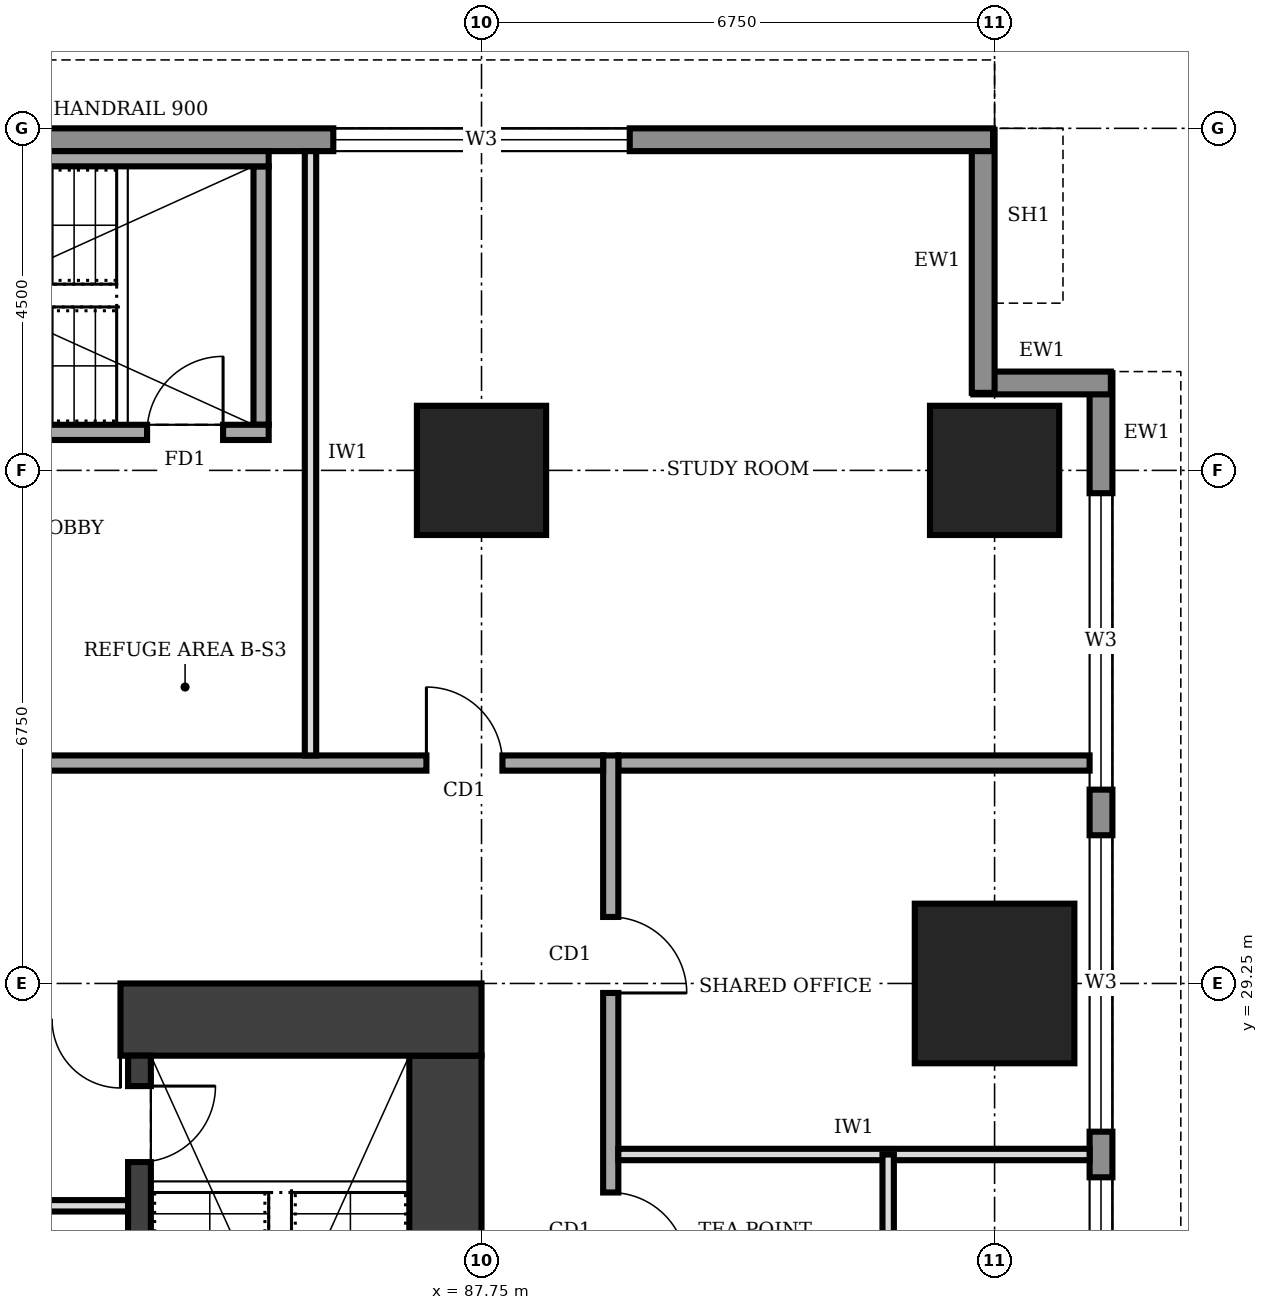
"""IFC4 building model, lengths in metres.
Left out: names, types, materials, properties, quantities, classifications, styles, units other than length and angle.
Written with IfcOpenShell. Run it as: python <this file> out.ifc"""

import sys

from ifc_helpers import new_model, si_unit, direction, frame, frame_2d, origin, origin_2d, place, context, subcontext, project, spatial, rectangle, extrude, element, fill, save


model = new_model("IFC4")
c1 = context("Model", 3, precision=1e-05, world=origin(), true_north=direction((0.0, 1.0)))
c2 = subcontext(c1, "Body", "Model", "MODEL_VIEW")
j1 = project(units=[si_unit("LENGTHUNIT", "METRE"), si_unit("PLANEANGLEUNIT", "RADIAN")], contexts=[c1])
p1 = place(None, origin())
s1 = spatial("IfcSite", under=j1, at=p1, CompositionType="ELEMENT")
p2 = place(p1, origin())
s2 = spatial("IfcBuilding", under=s1, at=p2, CompositionType="ELEMENT")
p3 = place(p2, frame((0.0, 0.0, 101.0)))
s3 = spatial("IfcBuildingStorey", under=s2, at=p3, CompositionType="ELEMENT", Elevation=101.0)
p4 = place(p3, frame((87.275, 12.2, 0.0), z_axis=(0.0, 0.0, 1.0), x_axis=(0.0, 1.0, 0.0)))
e1 = element("IfcWall", 1, at=p4, inside=s3, PredefinedType="SHEAR", context=c2, shape_type="SweptSolid", body=[
    extrude(rectangle(XDim=16.1, YDim=0.95, at=frame_2d((8.05, 0.0))), origin(), (0.0, 0.0, 1.0), 4.0),
])
p5 = place(p3, frame((87.75, 28.775, 0.0), z_axis=(0.0, 0.0, 1.0), x_axis=(-1.0, 0.0, 0.0)))
e2 = element("IfcWall", 2, at=p5, inside=s3, PredefinedType="SHEAR", context=c2, shape_type="SweptSolid", body=[
    extrude(rectangle(XDim=13.5, YDim=0.95, at=frame_2d((6.75, 0.0))), origin(), (0.0, 0.0, 1.0), 4.0),
])
p6 = place(p5, frame((4.75, 0.0, 0.0)))
e3 = element("IfcOpeningElement", 3, at=p6, cuts=e2, PredefinedType="OPENING", context=c2, shape_type="SweptSolid", body=[
    extrude(rectangle(XDim=1.8, YDim=2.1, at=frame_2d((0.9, 1.05))), frame((0.0, 0.485, 0.0), z_axis=(0.0, -1.0, 0.0), x_axis=(1.0, 0.0, 0.0)), (0.0, 0.0, 1.0), 0.97),
])
p7 = place(p3, frame((83.25, 12.2, 0.0), z_axis=(0.0, 0.0, 1.0), x_axis=(0.0, 1.0, 0.0)))
e4 = element("IfcWall", 4, at=p7, inside=s3, PredefinedType="SHEAR", context=c2, shape_type="SweptSolid", body=[
    extrude(rectangle(XDim=16.1, YDim=0.3, at=frame_2d((8.05, 0.0))), origin(), (0.0, 0.0, 1.0), 4.0),
])
p8 = place(p7, frame((14.7, 0.0, 0.0)))
e5 = element("IfcOpeningElement", 5, at=p8, cuts=e4, PredefinedType="OPENING", context=c2, shape_type="SweptSolid", body=[
    extrude(rectangle(XDim=1.0, YDim=2.1, at=frame_2d((0.5, 1.05))), frame((0.0, 0.16, 0.0), z_axis=(0.0, -1.0, 0.0), x_axis=(1.0, 0.0, 0.0)), (0.0, 0.0, 1.0), 0.32),
])
p9 = place(p7, frame((0.4, 0.0, 0.0)))
e6 = element("IfcOpeningElement", 6, at=p9, cuts=e4, PredefinedType="OPENING", context=c2, shape_type="SweptSolid", body=[
    extrude(rectangle(XDim=1.1, YDim=2.1, at=frame_2d((0.55, 1.05))), frame((0.0, 0.16, 0.0), z_axis=(0.0, -1.0, 0.0), x_axis=(1.0, 0.0, 0.0)), (0.0, 0.0, 1.0), 0.32),
])
p10 = place(p7, frame((6.0, 0.0, 0.0)))
e7 = element("IfcOpeningElement", 7, at=p10, cuts=e4, PredefinedType="OPENING", context=c2, shape_type="SweptSolid", body=[
    extrude(rectangle(XDim=1.1, YDim=2.1, at=frame_2d((0.55, 1.05))), frame((0.0, 0.16, 0.0), z_axis=(0.0, -1.0, 0.0), x_axis=(1.0, 0.0, 0.0)), (0.0, 0.0, 1.0), 0.32),
])
p11 = place(p3, frame((94.5, 29.25, 0.0), z_axis=(0.0, 0.0, 1.0), x_axis=(1.0, 0.0, 0.0)))
e8 = element("IfcColumn", 8, at=p11, inside=s3, PredefinedType="COLUMN", context=c2, shape_type="SweptSolid", body=[
    extrude(rectangle(XDim=2.1, YDim=2.1, at=origin_2d()), origin(), (0.0, 0.0, 1.0), 4.0),
])
for number, where, z_axis, x_axis in (
    (9, (87.75, 36.0, 0.0), (0.0, 0.0, 1.0), (1.0, 0.0, 0.0)),
    (10, (94.5, 36.0, 0.0), (0.0, 0.0, 1.0), (1.0, 0.0, 0.0)),
):
    element("IfcColumn", number, at=place(p3, frame(where, z_axis=z_axis, x_axis=x_axis)), inside=s3, PredefinedType="COLUMN", context=c2, shape_type="SweptSolid", body=[
        extrude(rectangle(XDim=1.7, YDim=1.7, at=origin_2d()), origin(), (0.0, 0.0, 1.0), 4.0),
    ])
p12 = place(p3, frame((95.9, 3.32, 0.0), z_axis=(0.0, 0.0, 1.0), x_axis=(0.0, 1.0, 0.0)))
e11 = element("IfcWall", 11, at=p12, inside=s3, PredefinedType="STANDARD", context=c2, shape_type="SweptSolid", body=[
    extrude(rectangle(XDim=33.96, YDim=0.3, at=frame_2d((16.98, 0.0))), origin(), (0.0, 0.0, 1.0), 3.75),
])
p13 = place(p12, frame((1.48, 0.0, 0.95)))
e12 = element("IfcOpeningElement", 12, at=p13, cuts=e11, PredefinedType="OPENING", context=c2, shape_type="SweptSolid", body=[
    extrude(rectangle(XDim=3.9, YDim=1.8, at=frame_2d((1.95, 0.9))), frame((0.0, 0.16, 0.0), z_axis=(0.0, -1.0, 0.0), x_axis=(1.0, 0.0, 0.0)), (0.0, 0.0, 1.0), 0.32),
])
p14 = place(p12, frame((5.98, 0.0, 0.95)))
e13 = element("IfcOpeningElement", 13, at=p14, cuts=e11, PredefinedType="OPENING", context=c2, shape_type="SweptSolid", body=[
    extrude(rectangle(XDim=3.9, YDim=1.8, at=frame_2d((1.95, 0.9))), frame((0.0, 0.16, 0.0), z_axis=(0.0, -1.0, 0.0), x_axis=(1.0, 0.0, 0.0)), (0.0, 0.0, 1.0), 0.32),
])
p15 = place(p12, frame((10.48, 0.0, 0.95)))
e14 = element("IfcOpeningElement", 14, at=p15, cuts=e11, PredefinedType="OPENING", context=c2, shape_type="SweptSolid", body=[
    extrude(rectangle(XDim=3.9, YDim=1.8, at=frame_2d((1.95, 0.9))), frame((0.0, 0.16, 0.0), z_axis=(0.0, -1.0, 0.0), x_axis=(1.0, 0.0, 0.0)), (0.0, 0.0, 1.0), 0.32),
])
p16 = place(p12, frame((14.98, 0.0, 0.95)))
e15 = element("IfcOpeningElement", 15, at=p16, cuts=e11, PredefinedType="OPENING", context=c2, shape_type="SweptSolid", body=[
    extrude(rectangle(XDim=3.9, YDim=1.8, at=frame_2d((1.95, 0.9))), frame((0.0, 0.16, 0.0), z_axis=(0.0, -1.0, 0.0), x_axis=(1.0, 0.0, 0.0)), (0.0, 0.0, 1.0), 0.32),
])
p17 = place(p12, frame((19.48, 0.0, 0.95)))
e16 = element("IfcOpeningElement", 16, at=p17, cuts=e11, PredefinedType="OPENING", context=c2, shape_type="SweptSolid", body=[
    extrude(rectangle(XDim=3.9, YDim=1.8, at=frame_2d((1.95, 0.9))), frame((0.0, 0.16, 0.0), z_axis=(0.0, -1.0, 0.0), x_axis=(1.0, 0.0, 0.0)), (0.0, 0.0, 1.0), 0.32),
])
p18 = place(p12, frame((23.98, 0.0, 0.95)))
e17 = element("IfcOpeningElement", 17, at=p18, cuts=e11, PredefinedType="OPENING", context=c2, shape_type="SweptSolid", body=[
    extrude(rectangle(XDim=3.9, YDim=1.8, at=frame_2d((1.95, 0.9))), frame((0.0, 0.16, 0.0), z_axis=(0.0, -1.0, 0.0), x_axis=(1.0, 0.0, 0.0)), (0.0, 0.0, 1.0), 0.32),
])
p19 = place(p12, frame((28.48, 0.0, 0.95)))
e18 = element("IfcOpeningElement", 18, at=p19, cuts=e11, PredefinedType="OPENING", context=c2, shape_type="SweptSolid", body=[
    extrude(rectangle(XDim=3.9, YDim=1.8, at=frame_2d((1.95, 0.9))), frame((0.0, 0.16, 0.0), z_axis=(0.0, -1.0, 0.0), x_axis=(1.0, 0.0, 0.0)), (0.0, 0.0, 1.0), 0.32),
])
p20 = place(p3, frame((96.03, 37.15, 0.0), z_axis=(0.0, 0.0, 1.0), x_axis=(-1.0, 0.0, 0.0)))
e19 = element("IfcWall", 19, at=p20, inside=s3, PredefinedType="STANDARD", context=c2, shape_type="SweptSolid", body=[
    extrude(rectangle(XDim=1.81, YDim=0.3, at=frame_2d((0.905, 0.0))), origin(), (0.0, 0.0, 1.0), 3.75),
])
p21 = place(p3, frame((94.35, 37.02, 0.0), z_axis=(0.0, 0.0, 1.0), x_axis=(0.0, 1.0, 0.0)))
e20 = element("IfcWall", 20, at=p21, inside=s3, PredefinedType="STANDARD", context=c2, shape_type="SweptSolid", body=[
    extrude(rectangle(XDim=3.46, YDim=0.3, at=frame_2d((1.73, 0.0))), origin(), (0.0, 0.0, 1.0), 2.85),
])
p22 = place(p3, frame((94.48, 40.35, 0.0), z_axis=(0.0, 0.0, 1.0), x_axis=(-1.0, 0.0, 0.0)))
e21 = element("IfcWall", 21, at=p22, inside=s3, PredefinedType="STANDARD", context=c2, shape_type="SweptSolid", body=[
    extrude(rectangle(XDim=26.96, YDim=0.3, at=frame_2d((13.48, 0.0))), origin(), (0.0, 0.0, 1.0), 3.75),
])
p23 = place(p22, frame((22.78, 0.0, 0.95)))
e22 = element("IfcOpeningElement", 22, at=p23, cuts=e21, PredefinedType="OPENING", context=c2, shape_type="SweptSolid", body=[
    extrude(rectangle(XDim=3.9, YDim=1.8, at=frame_2d((1.95, 0.9))), frame((0.0, 0.16, 0.0), z_axis=(0.0, -1.0, 0.0), x_axis=(1.0, 0.0, 0.0)), (0.0, 0.0, 1.0), 0.32),
])
p24 = place(p22, frame((18.28, 0.0, 0.95)))
e23 = element("IfcOpeningElement", 23, at=p24, cuts=e21, PredefinedType="OPENING", context=c2, shape_type="SweptSolid", body=[
    extrude(rectangle(XDim=3.9, YDim=1.8, at=frame_2d((1.95, 0.9))), frame((0.0, 0.16, 0.0), z_axis=(0.0, -1.0, 0.0), x_axis=(1.0, 0.0, 0.0)), (0.0, 0.0, 1.0), 0.32),
])
p25 = place(p22, frame((4.78, 0.0, 0.95)))
e24 = element("IfcOpeningElement", 24, at=p25, cuts=e21, PredefinedType="OPENING", context=c2, shape_type="SweptSolid", body=[
    extrude(rectangle(XDim=3.9, YDim=1.8, at=frame_2d((1.95, 0.9))), frame((0.0, 0.16, 0.0), z_axis=(0.0, -1.0, 0.0), x_axis=(1.0, 0.0, 0.0)), (0.0, 0.0, 1.0), 0.32),
])
p26 = place(p3, frame((81.3, 26.325, 0.0), z_axis=(0.0, 0.0, 1.0), x_axis=(1.0, 0.0, 0.0)))
e25 = element("IfcWall", 25, at=p26, inside=s3, PredefinedType="PARTITIONING", context=c2, shape_type="SweptSolid", body=[
    extrude(rectangle(XDim=1.8, YDim=0.15, at=frame_2d((0.9, 0.0))), origin(), (0.0, 0.0, 1.0), 3.75),
])
p27 = place(p3, frame((89.45, 8.45, 0.0), z_axis=(0.0, 0.0, 1.0), x_axis=(0.0, 1.0, 0.0)))
e26 = element("IfcWall", 26, at=p27, inside=s3, PredefinedType="SOLIDWALL", context=c2, shape_type="SweptSolid", body=[
    extrude(rectangle(XDim=23.8, YDim=0.2, at=frame_2d((11.9, 0.0))), origin(), (0.0, 0.0, 1.0), 3.75),
])
p28 = place(p27, frame((1.925, 0.0, 0.0)))
e27 = element("IfcOpeningElement", 27, at=p28, cuts=e26, PredefinedType="OPENING", context=c2, shape_type="SweptSolid", body=[
    extrude(rectangle(XDim=1.0, YDim=2.1, at=frame_2d((0.5, 1.05))), frame((0.0, 0.11, 0.0), z_axis=(0.0, -1.0, 0.0), x_axis=(1.0, 0.0, 0.0)), (0.0, 0.0, 1.0), 0.22),
])
p29 = place(p27, frame((5.8, 0.0, 0.0)))
e28 = element("IfcOpeningElement", 28, at=p29, cuts=e26, PredefinedType="OPENING", context=c2, shape_type="SweptSolid", body=[
    extrude(rectangle(XDim=0.9, YDim=2.1, at=frame_2d((0.45, 1.05))), frame((0.0, 0.11, 0.0), z_axis=(0.0, -1.0, 0.0), x_axis=(1.0, 0.0, 0.0)), (0.0, 0.0, 1.0), 0.22),
])
p30 = place(p27, frame((9.0, 0.0, 0.0)))
e29 = element("IfcOpeningElement", 29, at=p30, cuts=e26, PredefinedType="OPENING", context=c2, shape_type="SweptSolid", body=[
    extrude(rectangle(XDim=0.9, YDim=2.1, at=frame_2d((0.45, 1.05))), frame((0.0, 0.11, 0.0), z_axis=(0.0, -1.0, 0.0), x_axis=(1.0, 0.0, 0.0)), (0.0, 0.0, 1.0), 0.22),
])
p31 = place(p27, frame((14.55, 0.0, 0.0)))
e30 = element("IfcOpeningElement", 30, at=p31, cuts=e26, PredefinedType="OPENING", context=c2, shape_type="SweptSolid", body=[
    extrude(rectangle(XDim=0.9, YDim=2.1, at=frame_2d((0.45, 1.05))), frame((0.0, 0.11, 0.0), z_axis=(0.0, -1.0, 0.0), x_axis=(1.0, 0.0, 0.0)), (0.0, 0.0, 1.0), 0.22),
])
p32 = place(p27, frame((17.05, 0.0, 0.0)))
e31 = element("IfcOpeningElement", 31, at=p32, cuts=e26, PredefinedType="OPENING", context=c2, shape_type="SweptSolid", body=[
    extrude(rectangle(XDim=1.0, YDim=2.1, at=frame_2d((0.5, 1.05))), frame((0.0, 0.11, 0.0), z_axis=(0.0, -1.0, 0.0), x_axis=(1.0, 0.0, 0.0)), (0.0, 0.0, 1.0), 0.22),
])
p33 = place(p27, frame((11.95, 0.0, 0.0)))
e32 = element("IfcOpeningElement", 32, at=p33, cuts=e26, PredefinedType="OPENING", context=c2, shape_type="SweptSolid", body=[
    extrude(rectangle(XDim=1.0, YDim=2.1, at=frame_2d((0.5, 1.05))), frame((0.0, 0.11, 0.0), z_axis=(0.0, -1.0, 0.0), x_axis=(1.0, 0.0, 0.0)), (0.0, 0.0, 1.0), 0.22),
])
p34 = place(p27, frame((20.675, 0.0, 0.0)))
e33 = element("IfcOpeningElement", 33, at=p34, cuts=e26, PredefinedType="OPENING", context=c2, shape_type="SweptSolid", body=[
    extrude(rectangle(XDim=1.0, YDim=2.1, at=frame_2d((0.5, 1.05))), frame((0.0, 0.11, 0.0), z_axis=(0.0, -1.0, 0.0), x_axis=(1.0, 0.0, 0.0)), (0.0, 0.0, 1.0), 0.22),
])
p35 = place(p3, frame((89.35, 32.15, 0.0), z_axis=(0.0, 0.0, 1.0), x_axis=(-1.0, 0.0, 0.0)))
e34 = element("IfcWall", 34, at=p35, inside=s3, PredefinedType="SOLIDWALL", context=c2, shape_type="SweptSolid", body=[
    extrude(rectangle(XDim=26.05, YDim=0.2, at=frame_2d((13.025, 0.0))), origin(), (0.0, 0.0, 1.0), 3.75),
])
p36 = place(p35, frame((19.05, 0.0, 0.0)))
e35 = element("IfcOpeningElement", 35, at=p36, cuts=e34, PredefinedType="OPENING", context=c2, shape_type="SweptSolid", body=[
    extrude(rectangle(XDim=1.0, YDim=2.1, at=frame_2d((0.5, 1.05))), frame((0.0, 0.11, 0.0), z_axis=(0.0, -1.0, 0.0), x_axis=(1.0, 0.0, 0.0)), (0.0, 0.0, 1.0), 0.22),
])
p37 = place(p35, frame((7.85, 0.0, 0.0)))
e36 = element("IfcOpeningElement", 36, at=p37, cuts=e34, PredefinedType="OPENING", context=c2, shape_type="SweptSolid", body=[
    extrude(rectangle(XDim=1.0, YDim=2.1, at=frame_2d((0.5, 1.05))), frame((0.0, 0.11, 0.0), z_axis=(0.0, -1.0, 0.0), x_axis=(1.0, 0.0, 0.0)), (0.0, 0.0, 1.0), 0.22),
])
p38 = place(p35, frame((1.325, 0.0, 0.0)))
e37 = element("IfcOpeningElement", 37, at=p38, cuts=e34, PredefinedType="OPENING", context=c2, shape_type="SweptSolid", body=[
    extrude(rectangle(XDim=1.0, YDim=2.1, at=frame_2d((0.5, 1.05))), frame((0.0, 0.11, 0.0), z_axis=(0.0, -1.0, 0.0), x_axis=(1.0, 0.0, 0.0)), (0.0, 0.0, 1.0), 0.22),
])
p39 = place(p3, frame((89.55, 32.15, 0.0), z_axis=(0.0, 0.0, 1.0), x_axis=(1.0, 0.0, 0.0)))
e38 = element("IfcWall", 38, at=p39, inside=s3, PredefinedType="SOLIDWALL", context=c2, shape_type="SweptSolid", body=[
    extrude(rectangle(XDim=6.2, YDim=0.2, at=frame_2d((3.1, 0.0))), origin(), (0.0, 0.0, 1.0), 3.75),
])
p40 = place(p3, frame((85.5, 32.25, 0.0), z_axis=(0.0, 0.0, 1.0), x_axis=(0.0, 1.0, 0.0)))
e39 = element("IfcWall", 39, at=p40, inside=s3, PredefinedType="PARTITIONING", context=c2, shape_type="SweptSolid", body=[
    extrude(rectangle(XDim=7.95, YDim=0.15, at=frame_2d((3.975, 0.0))), origin(), (0.0, 0.0, 1.0), 3.75),
])
p41 = place(p3, frame((89.55, 27.0, 0.0), z_axis=(0.0, 0.0, 1.0), x_axis=(1.0, 0.0, 0.0)))
e40 = element("IfcWall", 40, at=p41, inside=s3, PredefinedType="PARTITIONING", context=c2, shape_type="SweptSolid", body=[
    extrude(rectangle(XDim=6.2, YDim=0.15, at=frame_2d((3.1, 0.0))), origin(), (0.0, 0.0, 1.0), 3.75),
])
p42 = place(p3, frame((93.1, 25.0, 0.0), z_axis=(0.0, 0.0, 1.0), x_axis=(0.0, 1.0, 0.0)))
e41 = element("IfcWall", 41, at=p42, inside=s3, PredefinedType="PARTITIONING", context=c2, shape_type="SweptSolid", body=[
    extrude(rectangle(XDim=2.0, YDim=0.15, at=frame_2d((1.0, 0.0))), origin(), (0.0, 0.0, 1.0), 3.75),
])
p43 = place(p3, frame((77.05, 36.5, 0.0), z_axis=(0.0, 0.0, 1.0), x_axis=(1.0, 0.0, 0.0)))
e42 = element("IfcWall", 42, at=p43, inside=s3, PredefinedType="SOLIDWALL", context=c2, shape_type="SweptSolid", body=[
    extrude(rectangle(XDim=7.9, YDim=0.2, at=frame_2d((3.95, 0.0))), origin(), (0.0, 0.0, 1.0), 3.75),
])
p44 = place(p43, frame((6.3, 0.0, 0.0)))
e43 = element("IfcOpeningElement", 43, at=p44, cuts=e42, PredefinedType="OPENING", context=c2, shape_type="SweptSolid", body=[
    extrude(rectangle(XDim=1.0, YDim=2.1, at=frame_2d((0.5, 1.05))), frame((0.0, 0.11, 0.0), z_axis=(0.0, -1.0, 0.0), x_axis=(1.0, 0.0, 0.0)), (0.0, 0.0, 1.0), 0.22),
])
p45 = place(p3, frame((77.05, 40.1, 0.0), z_axis=(0.0, 0.0, 1.0), x_axis=(1.0, 0.0, 0.0)))
e44 = element("IfcWall", 44, at=p45, inside=s3, PredefinedType="SOLIDWALL", context=c2, shape_type="SweptSolid", body=[
    extrude(rectangle(XDim=7.9, YDim=0.2, at=frame_2d((3.95, 0.0))), origin(), (0.0, 0.0, 1.0), 3.75),
])
p46 = place(p3, frame((84.85, 36.6, 0.0), z_axis=(0.0, 0.0, 1.0), x_axis=(0.0, 1.0, 0.0)))
e45 = element("IfcWall", 45, at=p46, inside=s3, PredefinedType="SOLIDWALL", context=c2, shape_type="SweptSolid", body=[
    extrude(rectangle(XDim=3.4, YDim=0.2, at=frame_2d((1.7, 0.0))), origin(), (0.0, 0.0, 1.0), 3.75),
])
p47 = place(p17, origin())
e46 = element("IfcWindow", 46, at=p47, inside=s3, PartitioningType="SINGLE_PANEL", PredefinedType="WINDOW", context=c2, shape_type="SweptSolid", body=[
    extrude(rectangle(XDim=3.9, YDim=1.8, at=frame_2d((1.95, 0.9))), frame((0.0, 0.03, 0.0), z_axis=(0.0, -1.0, 0.0), x_axis=(1.0, 0.0, 0.0)), (0.0, 0.0, 1.0), 0.06),
])
fill(e16, e46)
p48 = place(p18, origin())
e47 = element("IfcWindow", 47, at=p48, inside=s3, PartitioningType="SINGLE_PANEL", PredefinedType="WINDOW", context=c2, shape_type="SweptSolid", body=[
    extrude(rectangle(XDim=3.9, YDim=1.8, at=frame_2d((1.95, 0.9))), frame((0.0, 0.03, 0.0), z_axis=(0.0, -1.0, 0.0), x_axis=(1.0, 0.0, 0.0)), (0.0, 0.0, 1.0), 0.06),
])
fill(e17, e47)
p49 = place(p19, origin())
e48 = element("IfcWindow", 48, at=p49, inside=s3, PartitioningType="SINGLE_PANEL", PredefinedType="WINDOW", context=c2, shape_type="SweptSolid", body=[
    extrude(rectangle(XDim=3.9, YDim=1.8, at=frame_2d((1.95, 0.9))), frame((0.0, 0.03, 0.0), z_axis=(0.0, -1.0, 0.0), x_axis=(1.0, 0.0, 0.0)), (0.0, 0.0, 1.0), 0.06),
])
fill(e18, e48)
p50 = place(p25, origin())
e49 = element("IfcWindow", 49, at=p50, inside=s3, PartitioningType="SINGLE_PANEL", PredefinedType="WINDOW", context=c2, shape_type="SweptSolid", body=[
    extrude(rectangle(XDim=3.9, YDim=1.8, at=frame_2d((1.95, 0.9))), frame((0.0, 0.03, 0.0), z_axis=(0.0, -1.0, 0.0), x_axis=(1.0, 0.0, 0.0)), (0.0, 0.0, 1.0), 0.06),
])
fill(e24, e49)
p51 = place(p6, origin())
e50 = element("IfcDoor", 50, at=p51, inside=s3, OperationType="DOUBLE_DOOR_SINGLE_SWING", PredefinedType="DOOR", context=c2, shape_type="SweptSolid", body=[
    extrude(rectangle(XDim=1.8, YDim=2.1, at=frame_2d((0.9, 1.05))), frame((0.0, 0.025, 0.0), z_axis=(0.0, -1.0, 0.0), x_axis=(1.0, 0.0, 0.0)), (0.0, 0.0, 1.0), 0.05),
])
fill(e3, e50)
p52 = place(p8, frame((1.0, 0.0, 0.0), z_axis=(0.0, 0.0, 1.0), x_axis=(-1.0, 0.0, 0.0)))
e51 = element("IfcDoor", 51, at=p52, inside=s3, OperationType="SINGLE_SWING_LEFT", PredefinedType="DOOR", context=c2, shape_type="SweptSolid", body=[
    extrude(rectangle(XDim=1.0, YDim=2.1, at=frame_2d((0.5, 1.05))), frame((0.0, 0.025, 0.0), z_axis=(0.0, -1.0, 0.0), x_axis=(1.0, 0.0, 0.0)), (0.0, 0.0, 1.0), 0.05),
])
fill(e5, e51)
p53 = place(p32, frame((1.0, 0.0, 0.0), z_axis=(0.0, 0.0, 1.0), x_axis=(-1.0, 0.0, 0.0)))
e52 = element("IfcDoor", 52, at=p53, inside=s3, OperationType="SINGLE_SWING_RIGHT", PredefinedType="DOOR", context=c2, shape_type="SweptSolid", body=[
    extrude(rectangle(XDim=1.0, YDim=2.1, at=frame_2d((0.5, 1.05))), frame((0.0, 0.025, 0.0), z_axis=(0.0, -1.0, 0.0), x_axis=(1.0, 0.0, 0.0)), (0.0, 0.0, 1.0), 0.05),
])
fill(e31, e52)
p54 = place(p34, frame((1.0, 0.0, 0.0), z_axis=(0.0, 0.0, 1.0), x_axis=(-1.0, 0.0, 0.0)))
e53 = element("IfcDoor", 53, at=p54, inside=s3, OperationType="SINGLE_SWING_RIGHT", PredefinedType="DOOR", context=c2, shape_type="SweptSolid", body=[
    extrude(rectangle(XDim=1.0, YDim=2.1, at=frame_2d((0.5, 1.05))), frame((0.0, 0.025, 0.0), z_axis=(0.0, -1.0, 0.0), x_axis=(1.0, 0.0, 0.0)), (0.0, 0.0, 1.0), 0.05),
])
fill(e33, e53)
p55 = place(p38, frame((1.0, 0.0, 0.0), z_axis=(0.0, 0.0, 1.0), x_axis=(-1.0, 0.0, 0.0)))
e54 = element("IfcDoor", 54, at=p55, inside=s3, OperationType="SINGLE_SWING_LEFT", PredefinedType="DOOR", context=c2, shape_type="SweptSolid", body=[
    extrude(rectangle(XDim=1.0, YDim=2.1, at=frame_2d((0.5, 1.05))), frame((0.0, 0.025, 0.0), z_axis=(0.0, -1.0, 0.0), x_axis=(1.0, 0.0, 0.0)), (0.0, 0.0, 1.0), 0.05),
])
fill(e37, e54)
p56 = place(p44, origin())
e55 = element("IfcDoor", 55, at=p56, inside=s3, OperationType="SINGLE_SWING_RIGHT", PredefinedType="DOOR", context=c2, shape_type="SweptSolid", body=[
    extrude(rectangle(XDim=1.0, YDim=2.1, at=frame_2d((0.5, 1.05))), frame((0.0, 0.025, 0.0), z_axis=(0.0, -1.0, 0.0), x_axis=(1.0, 0.0, 0.0)), (0.0, 0.0, 1.0), 0.05),
])
fill(e43, e55)
save(model, sys.argv[1])
